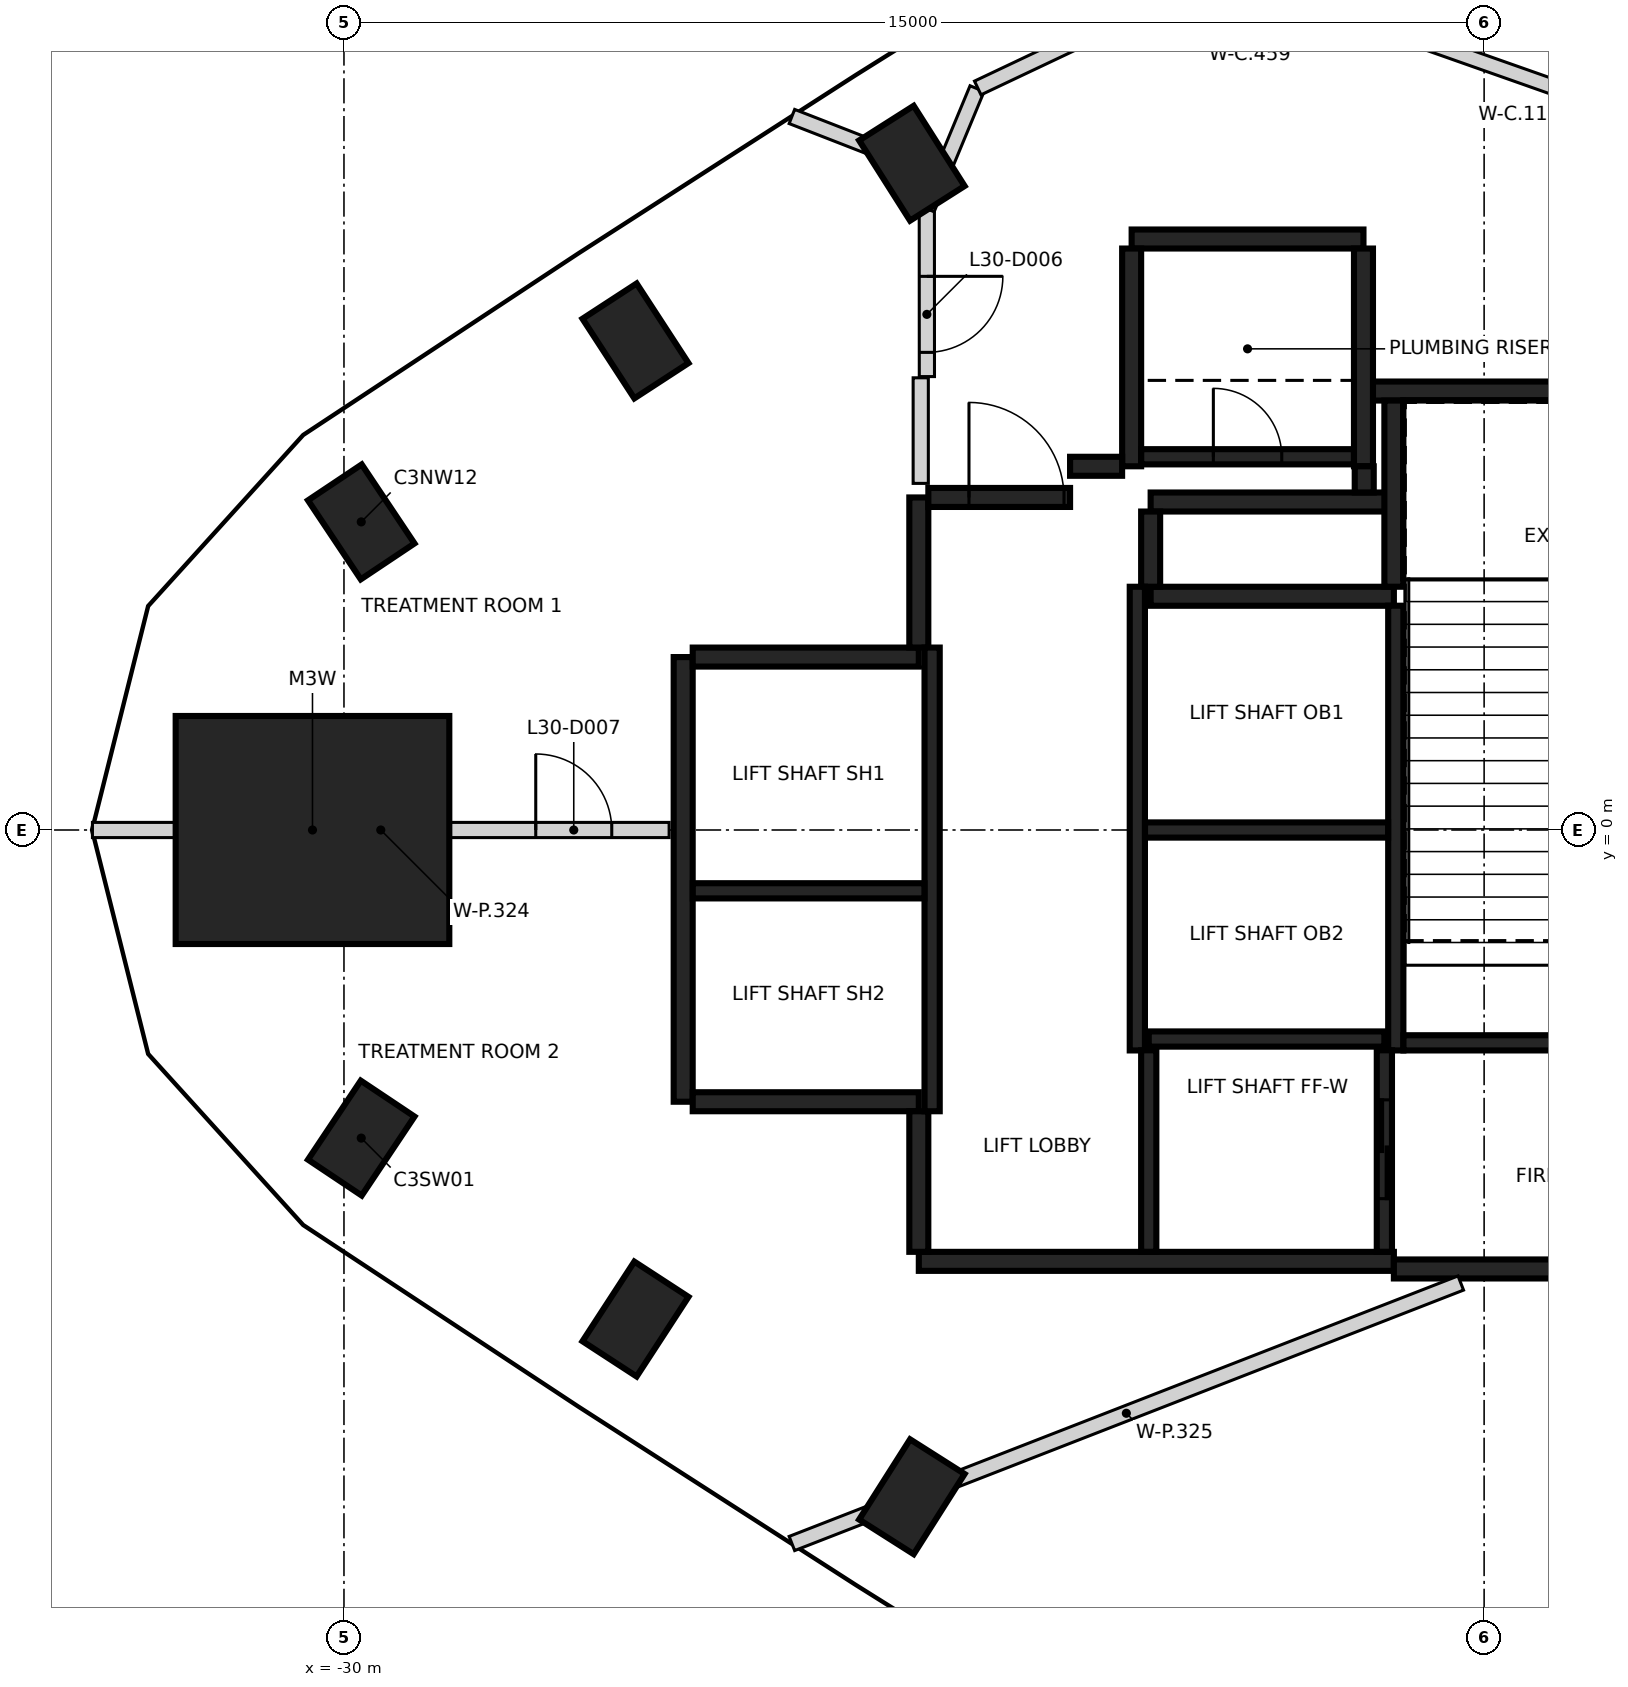
"""IFC4 building model, lengths in metres.
Left out: names, types, materials, properties, quantities, classifications, styles, units other than length and angle.
Written with IfcOpenShell. Run it as: python <this file> out.ifc"""

import sys

from ifc_helpers import new_model, si_unit, direction, frame, frame_2d, origin, origin_2d, place, context, subcontext, project, spatial, rectangle, extrude, element, fill, save


model = new_model("IFC4")
c1 = context("Model", 3, precision=1e-05, world=origin(), true_north=direction((0.0, 1.0)))
c2 = subcontext(c1, "Body", "Model", "MODEL_VIEW")
j1 = project(units=[si_unit("LENGTHUNIT", "METRE"), si_unit("PLANEANGLEUNIT", "RADIAN")], contexts=[c1])
p1 = place(None, origin())
s1 = spatial("IfcSite", under=j1, at=p1, CompositionType="ELEMENT")
p2 = place(p1, origin())
s2 = spatial("IfcBuilding", under=s1, at=p2, CompositionType="ELEMENT")
p3 = place(p2, frame((0.0, 0.0, 123.8)))
s3 = spatial("IfcBuildingStorey", under=s2, at=p3, CompositionType="ELEMENT", Elevation=123.8)
for number, where, z_axis, x_axis in (
    (1, (-22.529, 8.772, -0.4), (0.0, 0.0, 1.0), (-0.536, 0.844, 0.0)),
    (2, (-26.165, 6.434, -0.4), (0.0, 0.0, 1.0), (-0.546, 0.838, 0.0)),
    (3, (-29.773, 4.053, -0.4), (0.0, 0.0, 1.0), (-0.556, 0.831, 0.0)),
    (4, (-29.773, -4.053, -0.4), (0.0, 0.0, 1.0), (0.556, 0.831, 0.0)),
    (5, (-26.165, -6.434, -0.4), (0.0, 0.0, 1.0), (0.546, 0.838, 0.0)),
    (6, (-22.529, -8.772, -0.4), (0.0, 0.0, 1.0), (0.536, 0.844, 0.0)),
):
    element("IfcColumn", number, at=place(p3, frame(where, z_axis=z_axis, x_axis=x_axis)), inside=s3, PredefinedType="COLUMN", context=c2, shape_type="SweptSolid", body=[
        extrude(rectangle(XDim=1.25, YDim=0.85, at=origin_2d()), origin(), (0.0, 0.0, 1.0), 5.0),
    ])
p4 = place(p3, frame((-30.414, 0.0, -0.4), z_axis=(0.0, 0.0, 1.0), x_axis=(1.0, 0.0, 0.0)))
e7 = element("IfcColumn", 7, at=p4, inside=s3, PredefinedType="COLUMN", context=c2, shape_type="SweptSolid", body=[
    extrude(rectangle(XDim=3.6, YDim=3.0, at=origin_2d()), origin(), (0.0, 0.0, 1.0), 5.0),
])
p5 = place(p3, frame((-16.187, -5.675, 0.0), z_axis=(0.0, 0.0, 1.0), x_axis=(-1.0, 0.0, 0.0)))
e8 = element("IfcWall", 8, at=p5, inside=s3, PredefinedType="SHEAR", context=c2, shape_type="SweptSolid", body=[
    extrude(rectangle(XDim=6.25, YDim=0.25, at=frame_2d((3.125, 0.0))), origin(), (0.0, 0.0, 1.0), 4.6),
])
p6 = place(p3, frame((-25.537, -3.575, 0.0), z_axis=(0.0, 0.0, 1.0), x_axis=(0.0, 1.0, 0.0)))
e9 = element("IfcWall", 9, at=p6, inside=s3, PredefinedType="SHEAR", context=c2, shape_type="SweptSolid", body=[
    extrude(rectangle(XDim=5.85, YDim=0.25, at=frame_2d((2.925, 0.0))), origin(), (0.0, 0.0, 1.0), 4.6),
])
p7 = place(p3, frame((-10.963, -5.775, 0.0), z_axis=(0.0, 0.0, 1.0), x_axis=(-1.0, 0.0, 0.0)))
e10 = element("IfcWall", 10, at=p7, inside=s3, PredefinedType="SHEAR", context=c2, shape_type="SweptSolid", body=[
    extrude(rectangle(XDim=5.225, YDim=0.25, at=frame_2d((2.612, 0.0))), origin(), (0.0, 0.0, 1.0), 4.6),
])
p8 = place(p3, frame((-16.472, 5.775, 0.0), z_axis=(0.0, 0.0, 1.0), x_axis=(1.0, 0.0, 0.0)))
e11 = element("IfcWall", 11, at=p8, inside=s3, PredefinedType="SHEAR", context=c2, shape_type="SweptSolid", body=[
    extrude(rectangle(XDim=5.51, YDim=0.25, at=frame_2d((2.755, 0.0))), origin(), (0.0, 0.0, 1.0), 4.6),
])
p9 = place(p3, frame((-19.387, 3.075, 0.0), z_axis=(0.0, 0.0, 1.0), x_axis=(1.0, 0.0, 0.0)))
e12 = element("IfcWall", 12, at=p9, inside=s3, PredefinedType="SHEAR", context=c2, shape_type="SweptSolid", body=[
    extrude(rectangle(XDim=3.2, YDim=0.25, at=frame_2d((1.6, 0.0))), origin(), (0.0, 0.0, 1.0), 4.6),
])
for number, where, z_axis, x_axis in (
    (13, (-22.437, -3.575, 0.0), (0.0, 0.0, 1.0), (-1.0, 0.0, 0.0)),
    (14, (-25.412, 2.275, 0.0), (0.0, 0.0, 1.0), (1.0, 0.0, 0.0)),
):
    element("IfcWall", number, at=place(p3, frame(where, z_axis=z_axis, x_axis=x_axis)), inside=s3, PredefinedType="SHEAR", context=c2, shape_type="SweptSolid", body=[
        extrude(rectangle(XDim=2.975, YDim=0.25, at=frame_2d((1.487, 0.0))), origin(), (0.0, 0.0, 1.0), 4.6),
    ])
p10 = place(p3, frame((-19.637, 7.775, 0.0), z_axis=(0.0, 0.0, 1.0), x_axis=(1.0, 0.0, 0.0)))
e15 = element("IfcWall", 15, at=p10, inside=s3, PredefinedType="SHEAR", context=c2, shape_type="SweptSolid", body=[
    extrude(rectangle(XDim=3.05, YDim=0.25, at=frame_2d((1.525, 0.0))), origin(), (0.0, 0.0, 1.0), 4.6),
])
for number, where, z_axis, x_axis in (
    (16, (-16.587, 7.65, 0.0), (0.0, 0.0, 1.0), (0.0, -1.0, 0.0)),
    (17, (-19.637, 4.785, 0.0), (0.0, 0.0, 1.0), (0.0, 1.0, 0.0)),
):
    element("IfcWall", number, at=place(p3, frame(where, z_axis=z_axis, x_axis=x_axis)), inside=s3, PredefinedType="SHEAR", context=c2, shape_type="SweptSolid", body=[
        extrude(rectangle(XDim=2.865, YDim=0.25, at=frame_2d((1.432, 0.0))), origin(), (0.0, 0.0, 1.0), 4.6),
    ])
p11 = place(p3, frame((-16.302, 4.315, 0.0), z_axis=(0.0, 0.0, 1.0), x_axis=(-1.0, 0.0, 0.0)))
e18 = element("IfcWall", 18, at=p11, inside=s3, PredefinedType="SHEAR", context=c2, shape_type="SweptSolid", body=[
    extrude(rectangle(XDim=3.085, YDim=0.25, at=frame_2d((1.542, 0.0))), origin(), (0.0, 0.0, 1.0), 4.6),
])
p12 = place(p3, frame((-16.187, 3.2, 0.0), z_axis=(0.0, 0.0, 1.0), x_axis=(0.0, 1.0, 0.0)))
e19 = element("IfcWall", 19, at=p12, inside=s3, PredefinedType="SHEAR", context=c2, shape_type="SweptSolid", body=[
    extrude(rectangle(XDim=2.449, YDim=0.25, at=frame_2d((1.225, 0.0))), origin(), (0.0, 0.0, 1.0), 4.6),
])
p13 = place(p3, frame((-22.437, 2.4, 0.0), z_axis=(0.0, 0.0, 1.0), x_axis=(0.0, 1.0, 0.0)))
e20 = element("IfcWall", 20, at=p13, inside=s3, PredefinedType="SHEAR", context=c2, shape_type="SweptSolid", body=[
    extrude(rectangle(XDim=1.975, YDim=0.25, at=frame_2d((0.987, 0.0))), origin(), (0.0, 0.0, 1.0), 4.6),
])
p14 = place(p3, frame((-22.437, -5.55, 0.0), z_axis=(0.0, 0.0, 1.0), x_axis=(0.0, 1.0, 0.0)))
e21 = element("IfcWall", 21, at=p14, inside=s3, PredefinedType="SHEAR", context=c2, shape_type="SweptSolid", body=[
    extrude(rectangle(XDim=1.849, YDim=0.25, at=frame_2d((0.925, 0.0))), origin(), (0.0, 0.0, 1.0), 4.6),
])
p15 = place(p3, frame((-22.312, 4.375, 0.0), z_axis=(0.0, 0.0, 1.0), x_axis=(1.0, 0.0, 0.0)))
e22 = element("IfcWall", 22, at=p15, inside=s3, PredefinedType="SHEAR", context=c2, shape_type="SweptSolid", body=[
    extrude(rectangle(XDim=1.865, YDim=0.25, at=frame_2d((0.932, 0.0))), origin(), (0.0, 0.0, 1.0), 4.6),
])
p16 = place(p15, frame((0.535, 0.0, 0.0)))
e23 = element("IfcOpeningElement", 23, at=p16, cuts=e22, PredefinedType="OPENING", context=c2, shape_type="SweptSolid", body=[
    extrude(rectangle(XDim=1.25, YDim=2.1, at=frame_2d((0.625, 1.05))), frame((0.0, 0.135, 0.0), z_axis=(0.0, -1.0, 0.0), x_axis=(1.0, 0.0, 0.0)), (0.0, 0.0, 1.0), 0.27),
])
p17 = place(p3, frame((-19.387, 4.19, 0.0), z_axis=(0.0, 0.0, 1.0), x_axis=(0.0, -1.0, 0.0)))
e24 = element("IfcWall", 24, at=p17, inside=s3, PredefinedType="SHEAR", context=c2, shape_type="SweptSolid", body=[
    extrude(rectangle(XDim=0.989, YDim=0.25, at=frame_2d((0.495, 0.0))), origin(), (0.0, 0.0, 1.0), 4.6),
])
p18 = place(p3, frame((-20.447, 4.785, 0.0), z_axis=(0.0, 0.0, 1.0), x_axis=(1.0, 0.0, 0.0)))
e25 = element("IfcWall", 25, at=p18, inside=s3, PredefinedType="SHEAR", context=c2, shape_type="SweptSolid", body=[
    extrude(rectangle(XDim=0.685, YDim=0.25, at=frame_2d((0.342, 0.0))), origin(), (0.0, 0.0, 1.0), 4.6),
])
p19 = place(p3, frame((-16.577, 4.785, 0.0), z_axis=(0.0, 0.0, 1.0), x_axis=(0.0, -1.0, 0.0)))
e26 = element("IfcWall", 26, at=p19, inside=s3, PredefinedType="SHEAR", context=c2, shape_type="SweptSolid", body=[
    extrude(rectangle(XDim=0.344, YDim=0.25, at=frame_2d((0.172, 0.0))), origin(), (0.0, 0.0, 1.0), 4.6),
])
p20 = place(p3, frame((-16.162, 2.951, 0.0), z_axis=(0.0, 0.0, 1.0), x_axis=(0.0, -1.0, 0.0)))
e27 = element("IfcWall", 27, at=p20, inside=s3, PredefinedType="SHEAR", context=c2, shape_type="SweptSolid", body=[
    extrude(rectangle(XDim=5.851, YDim=0.2, at=frame_2d((2.925, 0.0))), origin(), (0.0, 0.0, 1.0), 4.6),
])
for number, where, z_axis, x_axis in (
    (28, (-19.562, -2.9, 0.0), (0.0, 0.0, 1.0), (0.0, 1.0, 0.0)),
    (29, (-22.262, 2.4, 0.0), (0.0, 0.0, 1.0), (0.0, -1.0, 0.0)),
):
    element("IfcWall", number, at=place(p3, frame(where, z_axis=z_axis, x_axis=x_axis)), inside=s3, PredefinedType="SHEAR", context=c2, shape_type="SweptSolid", body=[
        extrude(rectangle(XDim=6.1, YDim=0.2, at=frame_2d((3.05, 0.0))), origin(), (0.0, 0.0, 1.0), 4.6),
    ])
p21 = place(p3, frame((-10.963, -2.8, 0.0), z_axis=(0.0, 0.0, 1.0), x_axis=(-1.0, 0.0, 0.0)))
e30 = element("IfcWall", 30, at=p21, inside=s3, PredefinedType="SHEAR", context=c2, shape_type="SweptSolid", body=[
    extrude(rectangle(XDim=5.098, YDim=0.2, at=frame_2d((2.549, 0.0))), origin(), (0.0, 0.0, 1.0), 4.6),
])
p22 = place(p21, frame((1.774, 0.0, 0.0)))
e31 = element("IfcOpeningElement", 31, at=p22, cuts=e30, PredefinedType="OPENING", context=c2, shape_type="SweptSolid", body=[
    extrude(rectangle(XDim=1.4, YDim=2.1, at=frame_2d((0.7, 1.05))), frame((0.0, 0.11, 0.0), z_axis=(0.0, -1.0, 0.0), x_axis=(1.0, 0.0, 0.0)), (0.0, 0.0, 1.0), 0.22),
])
p23 = place(p3, frame((-16.263, 0.0, 0.0), z_axis=(0.0, 0.0, 1.0), x_axis=(-1.0, 0.0, 0.0)))
e32 = element("IfcWall", 32, at=p23, inside=s3, PredefinedType="SHEAR", context=c2, shape_type="SweptSolid", body=[
    extrude(rectangle(XDim=3.198, YDim=0.2, at=frame_2d((1.599, 0.0))), origin(), (0.0, 0.0, 1.0), 4.6),
])
p24 = place(p3, frame((-22.363, -0.8, 0.0), z_axis=(0.0, 0.0, 1.0), x_axis=(-1.0, 0.0, 0.0)))
e33 = element("IfcWall", 33, at=p24, inside=s3, PredefinedType="SHEAR", context=c2, shape_type="SweptSolid", body=[
    extrude(rectangle(XDim=3.048, YDim=0.2, at=frame_2d((1.524, 0.0))), origin(), (0.0, 0.0, 1.0), 4.6),
])
p25 = place(p3, frame((-19.511, 4.91, 0.0), z_axis=(0.0, 0.0, 1.0), x_axis=(1.0, 0.0, 0.0)))
e34 = element("IfcWall", 34, at=p25, inside=s3, PredefinedType="SHEAR", context=c2, shape_type="SweptSolid", body=[
    extrude(rectangle(XDim=2.798, YDim=0.2, at=frame_2d((1.399, 0.0))), origin(), (0.0, 0.0, 1.0), 4.6),
])
p26 = place(p25, frame((0.949, 0.0, 0.0)))
e35 = element("IfcOpeningElement", 35, at=p26, cuts=e34, PredefinedType="OPENING", context=c2, shape_type="SweptSolid", body=[
    extrude(rectangle(XDim=0.9, YDim=2.1, at=frame_2d((0.45, 1.05))), frame((0.0, 0.11, 0.0), z_axis=(0.0, -1.0, 0.0), x_axis=(1.0, 0.0, 0.0)), (0.0, 0.0, 1.0), 0.22),
])
p27 = place(p3, frame((-19.412, -2.75, 0.0), z_axis=(0.0, 0.0, 1.0), x_axis=(1.0, 0.0, 0.0)))
e36 = element("IfcWall", 36, at=p27, inside=s3, PredefinedType="SHEAR", context=c2, shape_type="SweptSolid", body=[
    extrude(rectangle(XDim=3.1, YDim=0.2, at=frame_2d((1.55, 0.0))), origin(), (0.0, 0.0, 1.0), 4.6),
])
p28 = place(p3, frame((-16.312, -2.898, 0.0), z_axis=(0.0, 0.0, 1.0), x_axis=(0.0, -1.0, 0.0)))
e37 = element("IfcWall", 37, at=p28, inside=s3, PredefinedType="SHEAR", context=c2, shape_type="SweptSolid", body=[
    extrude(rectangle(XDim=2.651, YDim=0.2, at=frame_2d((1.325, 0.0))), origin(), (0.0, 0.0, 1.0), 4.6),
])
p29 = place(p28, frame((0.652, 0.0, 0.0)))
e38 = element("IfcOpeningElement", 38, at=p29, cuts=e37, PredefinedType="OPENING", context=c2, shape_type="SweptSolid", body=[
    extrude(rectangle(XDim=1.3, YDim=2.1, at=frame_2d((0.65, 1.05))), frame((0.0, 0.11, 0.0), z_axis=(0.0, -1.0, 0.0), x_axis=(1.0, 0.0, 0.0)), (0.0, 0.0, 1.0), 0.22),
])
p30 = place(p3, frame((-19.412, -5.549, 0.0), z_axis=(0.0, 0.0, 1.0), x_axis=(0.0, 1.0, 0.0)))
e39 = element("IfcWall", 39, at=p30, inside=s3, PredefinedType="SHEAR", context=c2, shape_type="SweptSolid", body=[
    extrude(rectangle(XDim=2.651, YDim=0.2, at=frame_2d((1.325, 0.0))), origin(), (0.0, 0.0, 1.0), 4.6),
])
p31 = place(p3, frame((-22.412, 4.56, 0.0), z_axis=(0.0, 0.0, 1.0), x_axis=(0.0, 1.0, 0.0)))
e40 = element("IfcWall", 40, at=p31, inside=s3, PredefinedType="PARTITIONING", context=c2, shape_type="SweptSolid", body=[
    extrude(rectangle(XDim=1.389, YDim=0.2, at=frame_2d((0.694, 0.0))), origin(), (0.0, 0.0, 1.0), 4.6),
])
p32 = place(p3, frame((-22.332, 8.156, 0.0), z_axis=(0.0, 0.0, 1.0), x_axis=(0.000445732071, -0.999999900661, 0.0)))
e41 = element("IfcWall", 41, at=p32, inside=s3, PredefinedType="PARTITIONING", context=c2, shape_type="SweptSolid", body=[
    extrude(rectangle(XDim=2.191, YDim=0.2, at=frame_2d((1.095, 0.0))), origin(), (0.0, 0.0, 1.0), 4.6),
])
p33 = place(p32, frame((0.872, 0.0, 0.0)))
e42 = element("IfcOpeningElement", 42, at=p33, cuts=e41, PredefinedType="OPENING", context=c2, shape_type="SweptSolid", body=[
    extrude(rectangle(XDim=1.0, YDim=2.1, at=frame_2d((0.5, 1.05))), frame((0.0, 0.11, 0.0), z_axis=(0.0, -1.0, 0.0), x_axis=(1.0, 0.0, 0.0)), (0.0, 0.0, 1.0), 0.22),
])
p34 = place(p3, frame((-22.328, 8.172, 0.0), z_axis=(0.0, 0.0, 1.0), x_axis=(0.383795251276, 0.923418217872, 0.0)))
e43 = element("IfcWall", 43, at=p34, inside=s3, PredefinedType="PARTITIONING", context=c2, shape_type="SweptSolid", body=[
    extrude(rectangle(XDim=1.712, YDim=0.2, at=frame_2d((0.856, 0.0))), origin(), (0.0, 0.0, 1.0), 3.7),
])
p35 = place(p3, frame((-21.662, 9.762, 0.0), z_axis=(0.0, 0.0, 1.0), x_axis=(0.903777351921, 0.428002918394, 0.0)))
e44 = element("IfcWall", 44, at=p35, inside=s3, PredefinedType="PARTITIONING", context=c2, shape_type="SweptSolid", body=[
    extrude(rectangle(XDim=1.635, YDim=0.2, at=frame_2d((0.818, 0.0))), origin(), (0.0, 0.0, 1.0), 3.7),
])
p36 = place(p3, frame((-15.987, 10.444, 0.0), z_axis=(0.0, 0.0, 1.0), x_axis=(0.943118792832, -0.332455925811, 0.0)))
e45 = element("IfcWall", 45, at=p36, inside=s3, PredefinedType="PARTITIONING", context=c2, shape_type="SweptSolid", body=[
    extrude(rectangle(XDim=6.242, YDim=0.2, at=frame_2d((3.121, 0.0))), origin(), (0.0, 0.0, 1.0), 4.6),
])
p37 = place(p36, frame((2.621, 0.0, 0.0)))
e46 = element("IfcOpeningElement", 46, at=p37, cuts=e45, PredefinedType="OPENING", context=c2, shape_type="SweptSolid", body=[
    extrude(rectangle(XDim=1.0, YDim=2.1, at=frame_2d((0.5, 1.05))), frame((0.0, 0.11, 0.0), z_axis=(0.0, -1.0, 0.0), x_axis=(1.0, 0.0, 0.0)), (0.0, 0.0, 1.0), 0.22),
])
p38 = place(p3, frame((-33.309, 0.0, 0.0), z_axis=(0.0, 0.0, 1.0), x_axis=(1.0, 0.0, 0.0)))
e47 = element("IfcWall", 47, at=p38, inside=s3, PredefinedType="PARTITIONING", context=c2, shape_type="SweptSolid", body=[
    extrude(rectangle(XDim=7.587, YDim=0.2, at=frame_2d((3.793, 0.0))), origin(), (0.0, 0.0, 1.0), 4.6),
])
p39 = place(p38, frame((5.832, 0.0, 0.0)))
e48 = element("IfcOpeningElement", 48, at=p39, cuts=e47, PredefinedType="OPENING", context=c2, shape_type="SweptSolid", body=[
    extrude(rectangle(XDim=1.0, YDim=2.1, at=frame_2d((0.5, 1.05))), frame((0.0, 0.11, 0.0), z_axis=(0.0, -1.0, 0.0), x_axis=(1.0, 0.0, 0.0)), (0.0, 0.0, 1.0), 0.22),
])
p40 = place(p3, frame((-24.107, -9.387, 0.0), z_axis=(0.0, 0.0, 1.0), x_axis=(0.9318396159, 0.362870404194, 0.0)))
e49 = element("IfcWall", 49, at=p40, inside=s3, PredefinedType="PARTITIONING", context=c2, shape_type="SweptSolid", body=[
    extrude(rectangle(XDim=9.443, YDim=0.2, at=frame_2d((4.722, 0.0))), origin(), (0.0, 0.0, 1.0), 4.6),
])
p41 = place(p3, frame((-24.107, 9.387, 0.0), z_axis=(0.0, 0.0, 1.0), x_axis=(0.931856759711, -0.362826376357, 0.0)))
e50 = element("IfcWall", 50, at=p41, inside=s3, PredefinedType="PARTITIONING", context=c2, shape_type="SweptSolid", body=[
    extrude(rectangle(XDim=2.107, YDim=0.2, at=frame_2d((1.054, 0.0))), origin(), (0.0, 0.0, 1.0), 4.6),
])
p42 = place(p29, origin())
e51 = element("IfcDoor", 51, at=p42, inside=s3, OperationType="SLIDING_TO_RIGHT", PredefinedType="DOOR", context=c2, shape_type="SweptSolid", body=[
    extrude(rectangle(XDim=1.3, YDim=2.1, at=frame_2d((0.65, 1.05))), frame((0.0, 0.025, 0.0), z_axis=(0.0, -1.0, 0.0), x_axis=(1.0, 0.0, 0.0)), (0.0, 0.0, 1.0), 0.05),
])
fill(e38, e51)
p43 = place(p16, origin())
e52 = element("IfcDoor", 52, at=p43, inside=s3, OperationType="SINGLE_SWING_LEFT", PredefinedType="DOOR", context=c2, shape_type="SweptSolid", body=[
    extrude(rectangle(XDim=1.25, YDim=2.1, at=frame_2d((0.625, 1.05))), frame((0.0, 0.025, 0.0), z_axis=(0.0, -1.0, 0.0), x_axis=(1.0, 0.0, 0.0)), (0.0, 0.0, 1.0), 0.05),
])
fill(e23, e52)
p44 = place(p26, origin())
e53 = element("IfcDoor", 53, at=p44, inside=s3, OperationType="SINGLE_SWING_LEFT", PredefinedType="DOOR", context=c2, shape_type="SweptSolid", body=[
    extrude(rectangle(XDim=0.9, YDim=2.1, at=frame_2d((0.45, 1.05))), frame((0.0, 0.025, 0.0), z_axis=(0.0, -1.0, 0.0), x_axis=(1.0, 0.0, 0.0)), (0.0, 0.0, 1.0), 0.05),
])
fill(e35, e53)
p45 = place(p33, frame((1.0, 0.0, 0.0), z_axis=(0.0, 0.0, 1.0), x_axis=(-1.0, 0.0, 0.0)))
e54 = element("IfcDoor", 54, at=p45, inside=s3, OperationType="SINGLE_SWING_LEFT", PredefinedType="DOOR", context=c2, shape_type="SweptSolid", body=[
    extrude(rectangle(XDim=1.0, YDim=2.1, at=frame_2d((0.5, 1.05))), frame((0.0, 0.025, 0.0), z_axis=(0.0, -1.0, 0.0), x_axis=(1.0, 0.0, 0.0)), (0.0, 0.0, 1.0), 0.05),
])
fill(e42, e54)
p46 = place(p39, frame((1.0, 0.0, 0.0), z_axis=(0.0, 0.0, 1.0), x_axis=(-1.0, 0.0, 0.0)))
e55 = element("IfcDoor", 55, at=p46, inside=s3, OperationType="SINGLE_SWING_LEFT", PredefinedType="DOOR", context=c2, shape_type="SweptSolid", body=[
    extrude(rectangle(XDim=1.0, YDim=2.1, at=frame_2d((0.5, 1.05))), frame((0.0, 0.025, 0.0), z_axis=(0.0, -1.0, 0.0), x_axis=(1.0, 0.0, 0.0)), (0.0, 0.0, 1.0), 0.05),
])
fill(e48, e55)
save(model, sys.argv[1])
